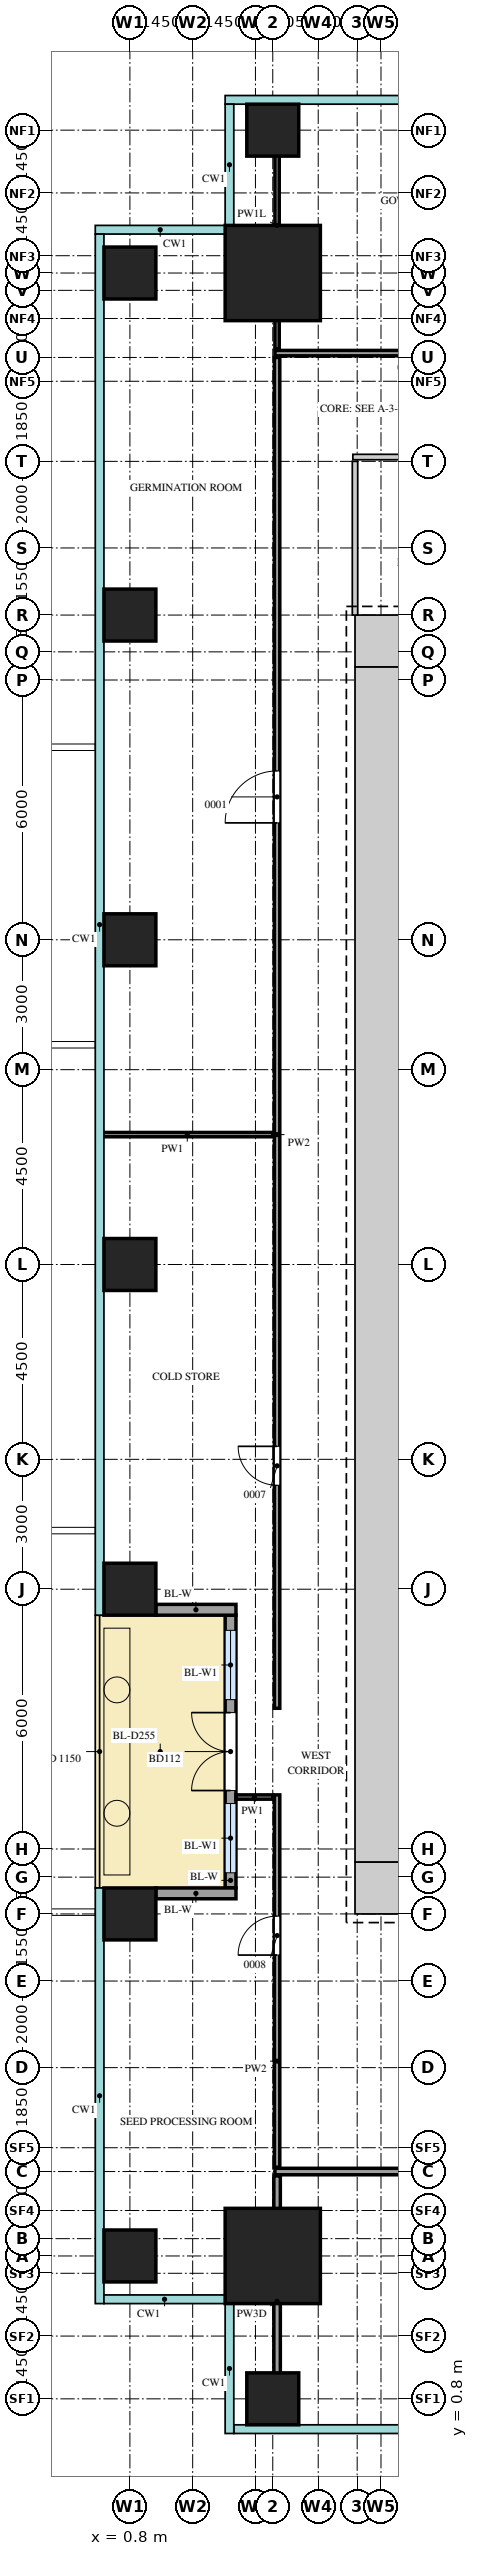
"""IFC4 building model, lengths in metres.
Left out: names, types, materials, properties, quantities, classifications, styles, units other than length and angle.
Written with IfcOpenShell. Run it as: python <this file> out.ifc"""

import sys

from ifc_helpers import new_model, si_unit, direction, frame, frame_2d, origin, origin_2d, place, context, subcontext, project, spatial, rectangle, extrude, source, transform, mapped, element, fill, save


model = new_model("IFC4")
c1 = context("Model", 3, precision=1e-05, world=origin(), true_north=direction((0.0, 1.0)))
c2 = subcontext(c1, "Body", "Model", "MODEL_VIEW")
j1 = project(units=[si_unit("LENGTHUNIT", "METRE"), si_unit("PLANEANGLEUNIT", "RADIAN")], contexts=[c1])
p1 = place(None, origin())
s1 = spatial("IfcSite", under=j1, at=p1, CompositionType="ELEMENT")
p2 = place(p1, origin())
s2 = spatial("IfcBuilding", under=s1, at=p2, CompositionType="ELEMENT")
p3 = place(p2, frame((0.0, 0.0, 55.5)))
s3 = spatial("IfcBuildingStorey", under=s2, at=p3, CompositionType="ELEMENT", Elevation=55.5)
m1 = source(origin(), c2, "Body", "SweptSolid", [
    extrude(rectangle(XDim=1.2, YDim=1.2, at=frame_2d((0.6, 0.0))), origin(), (0.0, 0.0, 1.0), 4.2),
])
for number, where, z_axis, x_axis in (
    (1, (6.0, 41.4, 0.0), (0.0, 0.0, 1.0), (1.0, 0.0, 0.0)),
    (2, (6.0, 12.6, 0.0), (0.0, 0.0, 1.0), (1.0, 0.0, 0.0)),
):
    element("IfcWall", number, at=place(p3, frame(where, z_axis=z_axis, x_axis=x_axis)), inside=s3, PredefinedType="SHEAR", context=c2, shape_type="MappedRepresentation", body=[
        mapped(m1, transform((0.0, 0.0, 0.0))),
    ])
m2 = source(origin(), c2, "Body", "SweptSolid", [
    extrude(rectangle(XDim=27.6, YDim=1.2, at=frame_2d((13.8, 0.0))), origin(), (0.0, 0.0, 1.0), 4.2),
])
p4 = place(p3, frame((6.6, 13.2, 0.0), z_axis=(0.0, 0.0, 1.0), x_axis=(0.0, 1.0, 0.0)))
e3 = element("IfcWall", 3, at=p4, inside=s3, PredefinedType="SHEAR", context=c2, shape_type="MappedRepresentation", body=[
    mapped(m2, transform((0.0, 0.0, 0.0))),
])
m3 = source(origin(), c2, "Body", "SweptSolid", [
    extrude(rectangle(XDim=2.2, YDim=2.2, at=origin_2d()), origin(), (0.0, 0.0, 1.0), 4.5),
])
for number, where, z_axis, x_axis in (
    (4, (4.1, 49.9, 0.0), (0.0, 0.0, 1.0), (1.0, 0.0, 0.0)),
    (5, (4.1, 4.1, 0.0), (0.0, 0.0, 1.0), (1.0, 0.0, 0.0)),
):
    element("IfcColumn", number, at=place(p3, frame(where, z_axis=z_axis, x_axis=x_axis)), inside=s3, PredefinedType="COLUMN", context=c2, shape_type="MappedRepresentation", body=[
        mapped(m3, transform((0.0, 0.0, 0.0))),
    ])
m4 = source(origin(), c2, "Body", "SweptSolid", [
    extrude(rectangle(XDim=1.2, YDim=1.2, at=origin_2d()), origin(), (0.0, 0.0, 1.0), 4.2),
])
for number, where, z_axis, x_axis in (
    (6, (4.1, 0.8, 0.0), (0.0, 0.0, 1.0), (1.0, 0.0, 0.0)),
    (7, (4.1, 53.2, 0.0), (0.0, 0.0, 1.0), (1.0, 0.0, 0.0)),
    (8, (0.8, 4.1, 0.0), (0.0, 0.0, 1.0), (1.0, 0.0, 0.0)),
    (9, (0.8, 12.0, 0.0), (0.0, 0.0, 1.0), (1.0, 0.0, 0.0)),
    (10, (0.8, 19.5, 0.0), (0.0, 0.0, 1.0), (1.0, 0.0, 0.0)),
    (11, (0.8, 27.0, 0.0), (0.0, 0.0, 1.0), (1.0, 0.0, 0.0)),
    (12, (0.8, 34.5, 0.0), (0.0, 0.0, 1.0), (1.0, 0.0, 0.0)),
    (13, (0.8, 42.0, 0.0), (0.0, 0.0, 1.0), (1.0, 0.0, 0.0)),
    (14, (0.8, 49.9, 0.0), (0.0, 0.0, 1.0), (1.0, 0.0, 0.0)),
):
    element("IfcColumn", number, at=place(p3, frame(where, z_axis=z_axis, x_axis=x_axis)), inside=s3, PredefinedType="COLUMN", context=c2, shape_type="MappedRepresentation", body=[
        mapped(m4, transform((0.0, 0.0, 0.0))),
    ])
m5 = source(origin(), c2, "Body", "SweptSolid", [
    extrude(rectangle(XDim=6.3, YDim=0.25, at=frame_2d((3.15, 0.0))), origin(), (0.0, 0.0, 1.0), 4.2),
])
p5 = place(p3, frame((3.125, 12.6, 0.0), z_axis=(0.0, 0.0, 1.0), x_axis=(0.0, 1.0, 0.0)))
e15 = element("IfcWall", 15, at=p5, inside=s3, PredefinedType="SOLIDWALL", context=c2, shape_type="MappedRepresentation", body=[
    mapped(m5, transform((0.0, 0.0, 0.0))),
])
m6 = source(origin(), c2, "Body", "SweptSolid", [
    extrude(rectangle(XDim=1.6, YDim=2.4, at=frame_2d((0.8, 1.2))), frame((0.0, 0.135, 0.0), z_axis=(0.0, -1.0, 0.0), x_axis=(1.0, 0.0, 0.0)), (0.0, 0.0, 1.0), 0.27),
])
p6 = place(p5, frame((0.35, 0.0, 0.0)))
e16 = element("IfcOpeningElement", 16, at=p6, cuts=e15, PredefinedType="OPENING", context=c2, shape_type="MappedRepresentation", body=[
    mapped(m6, transform((0.0, 0.0, 0.0))),
])
p7 = place(p5, frame((4.35, 0.0, 0.0)))
e17 = element("IfcOpeningElement", 17, at=p7, cuts=e15, PredefinedType="OPENING", context=c2, shape_type="MappedRepresentation", body=[
    mapped(m6, transform((0.0, 0.0, 0.0))),
])
m7 = source(origin(), c2, "Body", "SweptSolid", [
    extrude(rectangle(XDim=1.8, YDim=2.4, at=frame_2d((0.9, 1.2))), frame((0.0, 0.135, 0.0), z_axis=(0.0, -1.0, 0.0), x_axis=(1.0, 0.0, 0.0)), (0.0, 0.0, 1.0), 0.27),
])
p8 = place(p5, frame((2.25, 0.0, 0.0)))
e18 = element("IfcOpeningElement", 18, at=p8, cuts=e15, PredefinedType="OPENING", context=c2, shape_type="MappedRepresentation", body=[
    mapped(m7, transform((0.0, 0.0, 0.0))),
])
m8 = source(origin(), c2, "Body", "SweptSolid", [
    extrude(rectangle(XDim=1.85, YDim=0.25, at=frame_2d((0.925, 0.0))), origin(), (0.0, 0.0, 1.0), 4.2),
])
for number, where, z_axis, x_axis in (
    (19, (1.4, 12.475, 0.0), (0.0, 0.0, 1.0), (1.0, 0.0, 0.0)),
    (20, (1.4, 19.025, 0.0), (0.0, 0.0, 1.0), (1.0, 0.0, 0.0)),
):
    element("IfcWall", number, at=place(p3, frame(where, z_axis=z_axis, x_axis=x_axis)), inside=s3, PredefinedType="SOLIDWALL", context=c2, shape_type="MappedRepresentation", body=[
        mapped(m8, transform((0.0, 0.0, 0.0))),
    ])
m9 = source(origin(), c2, "Body", "SweptSolid", [
    extrude(rectangle(XDim=5.8, YDim=0.15, at=frame_2d((2.9, 0.0))), origin(), (0.0, 0.0, 1.0), 3.6),
])
p9 = place(p3, frame((4.2, 0.15, 0.0), z_axis=(0.0, 0.0, 1.0), x_axis=(0.0, 1.0, 0.0)))
e21 = element("IfcWall", 21, at=p9, inside=s3, PredefinedType="PARTITIONING", context=c2, shape_type="MappedRepresentation", body=[
    mapped(m9, transform((0.0, 0.0, 0.0))),
])
m10 = source(origin(), c2, "Body", "SweptSolid", [
    extrude(rectangle(XDim=22.15, YDim=0.15, at=frame_2d((11.075, 0.0))), origin(), (0.0, 0.0, 1.0), 4.3),
])
p10 = place(p3, frame((4.15, 6.05, 0.0), z_axis=(0.0, 0.0, 1.0), x_axis=(1.0, 0.0, 0.0)))
e22 = element("IfcWall", 22, at=p10, inside=s3, PredefinedType="PARTITIONING", context=c2, shape_type="MappedRepresentation", body=[
    mapped(m10, transform((0.0, 0.0, 0.0))),
])
m11 = source(origin(), c2, "Body", "SweptSolid", [
    extrude(rectangle(XDim=1.2, YDim=2.1, at=frame_2d((0.6, 1.05))), frame((0.0, 0.085, 0.0), z_axis=(0.0, -1.0, 0.0), x_axis=(1.0, 0.0, 0.0)), (0.0, 0.0, 1.0), 0.17),
])
p11 = place(p10, frame((9.2, 0.0, 0.0)))
e23 = element("IfcOpeningElement", 23, at=p11, cuts=e22, PredefinedType="OPENING", context=c2, shape_type="MappedRepresentation", body=[
    mapped(m11, transform((0.0, 0.0, 0.0))),
])
m12 = source(origin(), c2, "Body", "SweptSolid", [
    extrude(rectangle(XDim=0.85, YDim=0.1, at=frame_2d((0.425, 0.0))), origin(), (0.0, 0.0, 1.0), 4.3),
])
p12 = place(p3, frame((3.25, 14.7, 0.0), z_axis=(0.0, 0.0, 1.0), x_axis=(1.0, 0.0, 0.0)))
e24 = element("IfcWall", 24, at=p12, inside=s3, PredefinedType="PARTITIONING", context=c2, shape_type="MappedRepresentation", body=[
    mapped(m12, transform((0.0, 0.0, 0.0))),
])
m13 = source(origin(), c2, "Body", "SweptSolid", [
    extrude(rectangle(XDim=3.95, YDim=0.1, at=frame_2d((1.975, 0.0))), origin(), (0.0, 0.0, 1.0), 4.3),
])
p13 = place(p3, frame((0.15, 30.0, 0.0), z_axis=(0.0, 0.0, 1.0), x_axis=(1.0, 0.0, 0.0)))
e25 = element("IfcWall", 25, at=p13, inside=s3, PredefinedType="PARTITIONING", context=c2, shape_type="MappedRepresentation", body=[
    mapped(m13, transform((0.0, 0.0, 0.0))),
])
m14 = source(origin(), c2, "Body", "SweptSolid", [
    extrude(rectangle(XDim=3.55, YDim=0.125, at=frame_2d((1.775, 0.0))), origin(), (0.0, 0.0, 1.0), 4.3),
])
p14 = place(p3, frame((6.0, 42.0, 0.0), z_axis=(0.0, 0.0, 1.0), x_axis=(0.0, 1.0, 0.0)))
e26 = element("IfcWall", 26, at=p14, inside=s3, PredefinedType="PARTITIONING", context=c2, shape_type="MappedRepresentation", body=[
    mapped(m14, transform((0.0, 0.0, 0.0))),
])
m15 = source(origin(), c2, "Body", "SweptSolid", [
    extrude(rectangle(XDim=7.95, YDim=0.125, at=frame_2d((3.975, 0.0))), origin(), (0.0, 0.0, 1.0), 4.3),
])
p15 = place(p3, frame((5.95, 45.65, 0.0), z_axis=(0.0, 0.0, 1.0), x_axis=(1.0, 0.0, 0.0)))
e27 = element("IfcWall", 27, at=p15, inside=s3, PredefinedType="PARTITIONING", context=c2, shape_type="MappedRepresentation", body=[
    mapped(m15, transform((0.0, 0.0, 0.0))),
])
m16 = source(origin(), c2, "Body", "SweptSolid", [
    extrude(rectangle(XDim=0.9, YDim=2.1, at=frame_2d((0.45, 1.05))), frame((0.0, 0.073, 0.0), z_axis=(0.0, -1.0, 0.0), x_axis=(1.0, 0.0, 0.0)), (0.0, 0.0, 1.0), 0.145),
])
p16 = place(p15, frame((1.55, 0.0, 0.0)))
e28 = element("IfcOpeningElement", 28, at=p16, cuts=e27, PredefinedType="OPENING", context=c2, shape_type="MappedRepresentation", body=[
    mapped(m16, transform((0.0, 0.0, 0.0))),
])
p17 = place(p15, frame((5.65, 0.0, 0.0)))
e29 = element("IfcOpeningElement", 29, at=p17, cuts=e27, PredefinedType="OPENING", context=c2, shape_type="MappedRepresentation", body=[
    mapped(m16, transform((0.0, 0.0, 0.0))),
])
m17 = source(origin(), c2, "Body", "SweptSolid", [
    extrude(rectangle(XDim=26.6, YDim=0.125, at=frame_2d((13.3, 0.0))), origin(), (0.0, 0.0, 1.0), 4.3),
])
p18 = place(p3, frame((4.15, 48.05, 0.0), z_axis=(0.0, 0.0, 1.0), x_axis=(1.0, 0.0, 0.0)))
e30 = element("IfcWall", 30, at=p18, inside=s3, PredefinedType="PARTITIONING", context=c2, shape_type="MappedRepresentation", body=[
    mapped(m17, transform((0.0, 0.0, 0.0))),
])
p19 = place(p18, frame((3.5, 0.0, 0.0)))
e31 = element("IfcOpeningElement", 31, at=p19, cuts=e30, PredefinedType="OPENING", context=c2, shape_type="MappedRepresentation", body=[
    mapped(m16, transform((0.0, 0.0, 0.0))),
])
m18 = source(origin(), c2, "Body", "SweptSolid", [
    extrude(rectangle(XDim=1.2, YDim=2.1, at=frame_2d((0.6, 1.05))), frame((0.0, 0.073, 0.0), z_axis=(0.0, -1.0, 0.0), x_axis=(1.0, 0.0, 0.0)), (0.0, 0.0, 1.0), 0.145),
])
p20 = place(p18, frame((16.6, 0.0, 0.0)))
e32 = element("IfcOpeningElement", 32, at=p20, cuts=e30, PredefinedType="OPENING", context=c2, shape_type="MappedRepresentation", body=[
    mapped(m18, transform((0.0, 0.0, 0.0))),
])
m19 = source(origin(), c2, "Body", "SweptSolid", [
    extrude(rectangle(XDim=5.7, YDim=0.1, at=frame_2d((2.85, 0.0))), origin(), (0.0, 0.0, 1.0), 3.6),
])
p21 = place(p3, frame((4.2, 48.15, 0.0), z_axis=(0.0, 0.0, 1.0), x_axis=(0.0, 1.0, 0.0)))
e33 = element("IfcWall", 33, at=p21, inside=s3, PredefinedType="PARTITIONING", context=c2, shape_type="MappedRepresentation", body=[
    mapped(m19, transform((0.0, 0.0, 0.0))),
])
m20 = source(origin(), c2, "Body", "SweptSolid", [
    extrude(rectangle(XDim=8.6, YDim=0.125, at=frame_2d((4.3, 0.0))), origin(), (0.0, 0.0, 1.0), 4.3),
])
p22 = place(p3, frame((4.2, 6.15, 0.0), z_axis=(0.0, 0.0, 1.0), x_axis=(0.0, 1.0, 0.0)))
e34 = element("IfcWall", 34, at=p22, inside=s3, PredefinedType="PARTITIONING", context=c2, shape_type="MappedRepresentation", body=[
    mapped(m20, transform((0.0, 0.0, 0.0))),
])
p23 = place(p22, frame((4.9, 0.0, 0.0)))
e35 = element("IfcOpeningElement", 35, at=p23, cuts=e34, PredefinedType="OPENING", context=c2, shape_type="MappedRepresentation", body=[
    mapped(m16, transform((0.0, 0.0, 0.0))),
])
m21 = source(origin(), c2, "Body", "SweptSolid", [
    extrude(rectangle(XDim=31.2, YDim=0.125, at=frame_2d((15.6, 0.0))), origin(), (0.0, 0.0, 1.0), 4.3),
])
p24 = place(p3, frame((4.2, 16.75, 0.0), z_axis=(0.0, 0.0, 1.0), x_axis=(0.0, 1.0, 0.0)))
e36 = element("IfcWall", 36, at=p24, inside=s3, PredefinedType="PARTITIONING", context=c2, shape_type="MappedRepresentation", body=[
    mapped(m21, transform((0.0, 0.0, 0.0))),
])
p25 = place(p24, frame((5.15, 0.0, 0.0)))
e37 = element("IfcOpeningElement", 37, at=p25, cuts=e36, PredefinedType="OPENING", context=c2, shape_type="MappedRepresentation", body=[
    mapped(m16, transform((0.0, 0.0, 0.0))),
])
p26 = place(p24, frame((20.45, 0.0, 0.0)))
e38 = element("IfcOpeningElement", 38, at=p26, cuts=e36, PredefinedType="OPENING", context=c2, shape_type="MappedRepresentation", body=[
    mapped(m18, transform((0.0, 0.0, 0.0))),
])
m22 = source(origin(), c2, "Body", "SweptSolid", [
    extrude(rectangle(XDim=1.6, YDim=2.4, at=frame_2d((0.8, 1.2))), frame((0.0, 0.03, 0.0), z_axis=(0.0, -1.0, 0.0), x_axis=(1.0, 0.0, 0.0)), (0.0, 0.0, 1.0), 0.06),
])
p27 = place(p6, origin())
e39 = element("IfcWindow", 39, at=p27, inside=s3, PartitioningType="SINGLE_PANEL", PredefinedType="WINDOW", context=c2, shape_type="MappedRepresentation", body=[
    mapped(m22, transform((0.0, 0.0, 0.0))),
])
fill(e16, e39)
p28 = place(p7, origin())
e40 = element("IfcWindow", 40, at=p28, inside=s3, PartitioningType="SINGLE_PANEL", PredefinedType="WINDOW", context=c2, shape_type="MappedRepresentation", body=[
    mapped(m22, transform((0.0, 0.0, 0.0))),
])
fill(e17, e40)
m23 = source(origin(), c2, "Body", "SweptSolid", [
    extrude(rectangle(XDim=1.8, YDim=2.4, at=frame_2d((0.9, 1.2))), frame((0.0, 0.025, 0.0), z_axis=(0.0, -1.0, 0.0), x_axis=(1.0, 0.0, 0.0)), (0.0, 0.0, 1.0), 0.05),
])
p29 = place(p8, origin())
e41 = element("IfcDoor", 41, at=p29, inside=s3, OperationType="DOUBLE_DOOR_DOUBLE_SWING", PredefinedType="DOOR", context=c2, shape_type="MappedRepresentation", body=[
    mapped(m23, transform((0.0, 0.0, 0.0))),
])
fill(e18, e41)
m24 = source(origin(), c2, "Body", "SweptSolid", [
    extrude(rectangle(XDim=0.9, YDim=2.1, at=frame_2d((0.45, 1.05))), frame((0.0, 0.025, 0.0), z_axis=(0.0, -1.0, 0.0), x_axis=(1.0, 0.0, 0.0)), (0.0, 0.0, 1.0), 0.05),
])
p30 = place(p23, origin())
e42 = element("IfcDoor", 42, at=p30, inside=s3, OperationType="SINGLE_SWING_RIGHT", PredefinedType="DOOR", context=c2, shape_type="MappedRepresentation", body=[
    mapped(m24, transform((0.0, 0.0, 0.0))),
])
fill(e35, e42)
p31 = place(p25, origin())
e43 = element("IfcDoor", 43, at=p31, inside=s3, OperationType="SINGLE_SWING_LEFT", PredefinedType="DOOR", context=c2, shape_type="MappedRepresentation", body=[
    mapped(m24, transform((0.0, 0.0, 0.0))),
])
fill(e37, e43)
m25 = source(origin(), c2, "Body", "SweptSolid", [
    extrude(rectangle(XDim=1.2, YDim=2.1, at=frame_2d((0.6, 1.05))), frame((0.0, 0.025, 0.0), z_axis=(0.0, -1.0, 0.0), x_axis=(1.0, 0.0, 0.0)), (0.0, 0.0, 1.0), 0.05),
])
p32 = place(p26, origin())
e44 = element("IfcDoor", 44, at=p32, inside=s3, OperationType="SINGLE_SWING_RIGHT", PredefinedType="DOOR", context=c2, shape_type="MappedRepresentation", body=[
    mapped(m25, transform((0.0, 0.0, 0.0))),
])
fill(e38, e44)
save(model, sys.argv[1])
